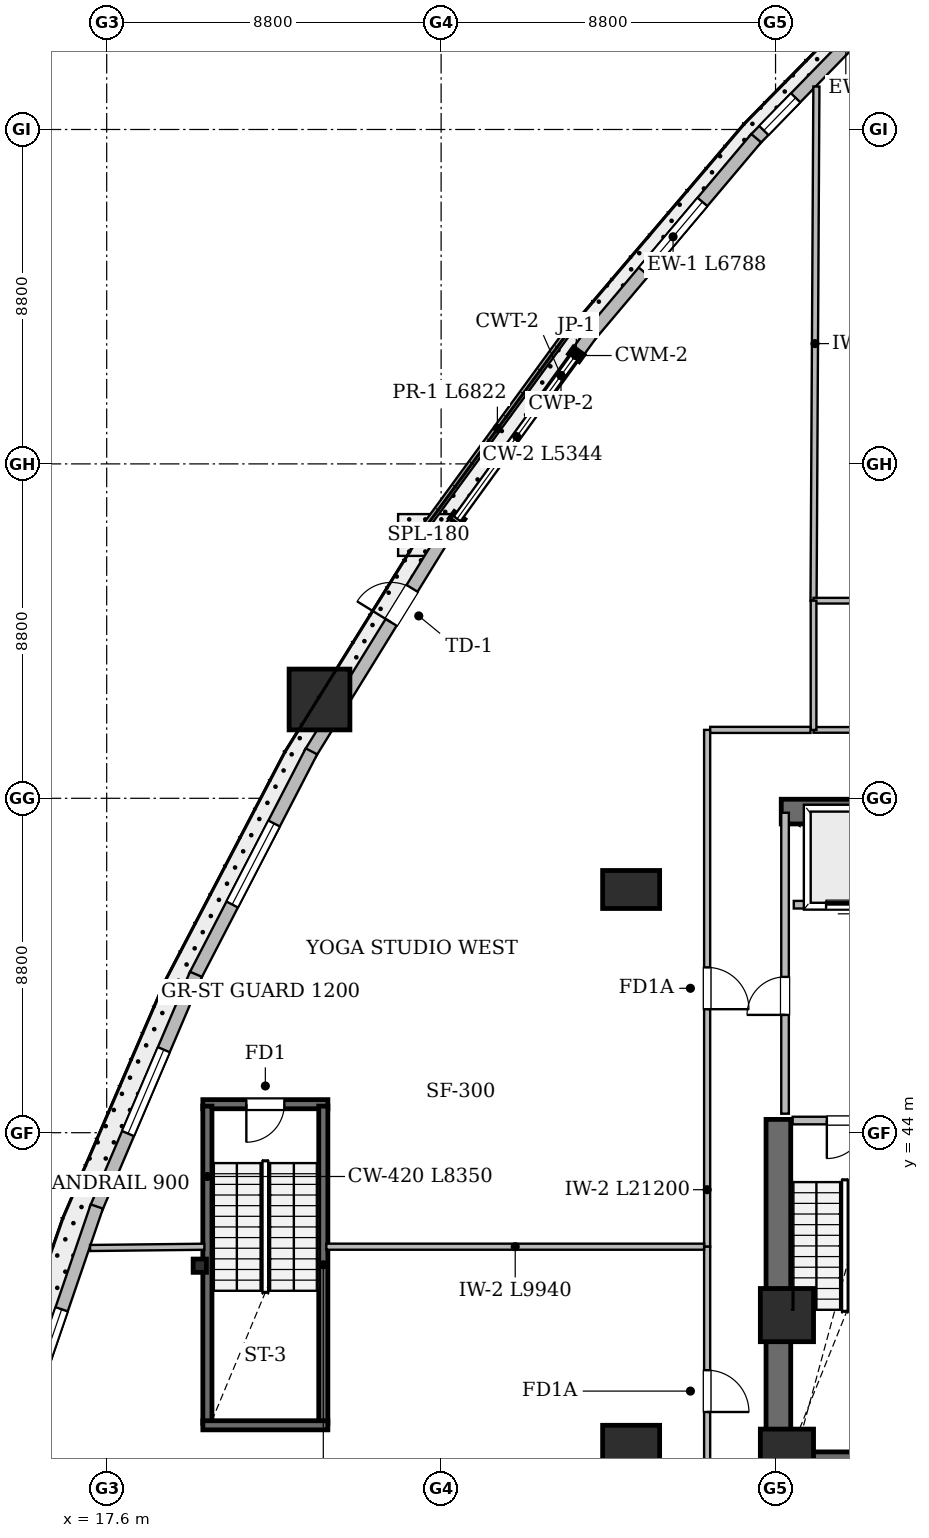
"""IFC4 building model, lengths in metres.
Left out: names, types, materials, properties, quantities, classifications, styles, units other than length and angle.
Written with IfcOpenShell. Run it as: python <this file> out.ifc"""

import sys

from ifc_helpers import new_model, si_unit, direction, frame, frame_2d, origin, origin_2d, place, context, subcontext, project, spatial, rectangle, i_section, extrude, element, fill, save


model = new_model("IFC4")
c1 = context("Model", 3, precision=1e-05, world=origin(), true_north=direction((0.0, 1.0)))
c2 = subcontext(c1, "Body", "Model", "MODEL_VIEW")
j1 = project(units=[si_unit("LENGTHUNIT", "METRE"), si_unit("PLANEANGLEUNIT", "RADIAN")], contexts=[c1])
p1 = place(None, origin())
s1 = spatial("IfcSite", under=j1, at=p1, CompositionType="ELEMENT")
p2 = place(p1, origin())
s2 = spatial("IfcBuilding", under=s1, at=p2, CompositionType="ELEMENT")
p3 = place(p2, frame((0.0, 0.0, 19.2)))
s3 = spatial("IfcBuildingStorey", under=s2, at=p3, CompositionType="ELEMENT", Elevation=19.2)
p4 = place(p3, frame((35.35, 52.45, 0.0), z_axis=(0.0, 0.0, 1.0), x_axis=(1.0, 0.0, 0.0)))
e1 = element("IfcWall", 1, at=p4, inside=s3, PredefinedType="SHEAR", context=c2, shape_type="SweptSolid", body=[
    extrude(rectangle(XDim=17.3, YDim=0.65, at=frame_2d((8.65, 0.0))), origin(), (0.0, 0.0, 1.0), 4.35),
])
p5 = place(p3, frame((34.95, 35.275, 0.0), z_axis=(0.0, 0.0, 1.0), x_axis=(1.0, 0.0, 0.0)))
e2 = element("IfcWall", 2, at=p5, inside=s3, PredefinedType="SHEAR", context=c2, shape_type="SweptSolid", body=[
    extrude(rectangle(XDim=4.15, YDim=0.65, at=frame_2d((2.075, 0.0))), origin(), (0.0, 0.0, 1.0), 4.35),
])
p6 = place(p3, frame((35.275, 34.95, 0.0), z_axis=(0.0, 0.0, 1.0), x_axis=(0.0, 1.0, 0.0)))
e3 = element("IfcWall", 3, at=p6, inside=s3, PredefinedType="SHEAR", context=c2, shape_type="SweptSolid", body=[
    extrude(rectangle(XDim=9.4, YDim=0.65, at=frame_2d((4.7, 0.0))), origin(), (0.0, 0.0, 1.0), 4.35),
])
for number, where, z_axis, x_axis in (
    (4, (35.5, 35.5, 0.0), (0.0, 0.0, 1.0), (1.0, 0.0, 0.0)),
    (5, (35.5, 39.2, 0.0), (0.0, 0.0, 1.0), (1.0, 0.0, 0.0)),
):
    element("IfcColumn", number, at=place(p3, frame(where, z_axis=z_axis, x_axis=x_axis)), inside=s3, PredefinedType="COLUMN", context=c2, shape_type="SweptSolid", body=[
        extrude(rectangle(XDim=1.4, YDim=1.4, at=origin_2d()), origin(), (0.0, 0.0, 1.0), 4.8),
    ])
for number, where, z_axis, x_axis in (
    (6, (31.4, 35.8, 0.0), (0.0, 0.0, 1.0), (1.0, 0.0, 0.0)),
    (7, (31.4, 50.4, 0.0), (0.0, 0.0, 1.0), (1.0, 0.0, 0.0)),
):
    element("IfcColumn", number, at=place(p3, frame(where, z_axis=z_axis, x_axis=x_axis)), inside=s3, PredefinedType="COLUMN", context=c2, shape_type="SweptSolid", body=[
        extrude(rectangle(XDim=1.5, YDim=1.0, at=origin_2d()), origin(), (0.0, 0.0, 1.0), 4.8),
    ])
p7 = place(p3, frame((23.2, 55.4, 0.0), z_axis=(0.0, 0.0, 1.0), x_axis=(1.0, 0.0, 0.0)))
e8 = element("IfcColumn", 8, at=p7, inside=s3, PredefinedType="COLUMN", context=c2, shape_type="SweptSolid", body=[
    extrude(rectangle(XDim=1.6, YDim=1.6, at=origin_2d()), origin(), (0.0, 0.0, 1.0), 4.8),
])
p8 = place(p3, frame((20.05, 40.5, 0.0), z_axis=(0.0, 0.0, 1.0), x_axis=(1.0, 0.0, 0.0)))
e9 = element("IfcColumn", 9, at=p8, inside=s3, PredefinedType="PILASTER", context=c2, shape_type="SweptSolid", body=[
    extrude(i_section(OverallWidth=0.35, OverallDepth=0.35, WebThickness=0.012, FlangeThickness=0.019, FilletRadius=0.02, at=origin_2d()), origin(), (0.0, 0.0, 1.0), 4.8),
])
p9 = place(p3, frame((39.454, 75.062, 0.0), z_axis=(0.0, 0.0, 1.0), x_axis=(-0.697411972143, -0.716670455029, 0.0)))
e10 = element("IfcWall", 10, at=p9, inside=s3, PredefinedType="SOLIDWALL", context=c2, shape_type="SweptSolid", body=[
    extrude(rectangle(XDim=6.896, YDim=0.34, at=frame_2d((3.448, 0.0))), origin(), (0.0, 0.0, 1.0), 4.35),
])
p10 = place(p9, frame((1.053, 0.0, 0.75)))
e11 = element("IfcOpeningElement", 11, at=p10, cuts=e10, PredefinedType="OPENING", context=c2, shape_type="SweptSolid", body=[
    extrude(rectangle(XDim=2.4, YDim=2.2, at=frame_2d((1.2, 1.1))), frame((0.0, 0.18, 0.0), z_axis=(0.0, -1.0, 0.0), x_axis=(1.0, 0.0, 0.0)), (0.0, 0.0, 1.0), 0.36),
])
p11 = place(p9, frame((5.341, 0.0, 0.78)))
e12 = element("IfcOpeningElement", 12, at=p11, cuts=e10, PredefinedType="OPENING", context=c2, shape_type="SweptSolid", body=[
    extrude(rectangle(XDim=1.2, YDim=1.55, at=frame_2d((0.6, 0.775))), frame((0.0, 0.18, 0.0), z_axis=(0.0, -1.0, 0.0), x_axis=(1.0, 0.0, 0.0)), (0.0, 0.0, 1.0), 0.36),
])
p12 = place(p3, frame((34.691, 70.171, 0.0), z_axis=(0.0, 0.0, 1.0), x_axis=(-0.64454325071, -0.764567850465, 0.0)))
e13 = element("IfcWall", 13, at=p12, inside=s3, PredefinedType="SOLIDWALL", context=c2, shape_type="SweptSolid", body=[
    extrude(rectangle(XDim=6.788, YDim=0.34, at=frame_2d((3.394, 0.0))), origin(), (0.0, 0.0, 1.0), 4.35),
])
p13 = place(p12, frame((2.194, 0.0, 0.75)))
e14 = element("IfcOpeningElement", 14, at=p13, cuts=e13, PredefinedType="OPENING", context=c2, shape_type="SweptSolid", body=[
    extrude(rectangle(XDim=2.4, YDim=2.2, at=frame_2d((1.2, 1.1))), frame((0.0, 0.18, 0.0), z_axis=(0.0, -1.0, 0.0), x_axis=(1.0, 0.0, 0.0)), (0.0, 0.0, 1.0), 0.36),
])
p14 = place(p3, frame((30.359, 65.037, 0.0), z_axis=(0.0, 0.0, 1.0), x_axis=(-0.586729168236, -0.809783232193, 0.0)))
e15 = element("IfcWall", 15, at=p14, inside=s3, PredefinedType="SOLIDWALL", context=c2, shape_type="SweptSolid", body=[
    extrude(rectangle(XDim=0.705, YDim=0.34, at=frame_2d((0.353, 0.0))), origin(), (0.0, 0.0, 1.0), 4.35),
])
p15 = place(p3, frame((26.833, 60.171, 0.0), z_axis=(0.0, 0.0, 1.0), x_axis=(-0.586956222387, -0.809618671352, 0.0)))
e16 = element("IfcWall", 16, at=p15, inside=s3, PredefinedType="SOLIDWALL", context=c2, shape_type="SweptSolid", body=[
    extrude(rectangle(XDim=0.705, YDim=0.34, at=frame_2d((0.353, 0.0))), origin(), (0.0, 0.0, 1.0), 4.35),
])
p16 = place(p3, frame((26.458, 59.658, 0.0), z_axis=(0.0, 0.0, 1.0), x_axis=(-0.524888702996, -0.851170869724, 0.0)))
e17 = element("IfcWall", 17, at=p16, inside=s3, PredefinedType="SOLIDWALL", context=c2, shape_type="SweptSolid", body=[
    extrude(rectangle(XDim=6.677, YDim=0.34, at=frame_2d((3.339, 0.0))), origin(), (0.0, 0.0, 1.0), 3.538),
])
p17 = place(p16, frame((1.567, 0.0, 0.0)))
e18 = element("IfcOpeningElement", 18, at=p17, cuts=e17, PredefinedType="OPENING", context=c2, shape_type="SweptSolid", body=[
    extrude(rectangle(XDim=1.05, YDim=2.15, at=frame_2d((0.525, 1.075))), frame((0.0, 0.18, 0.0), z_axis=(0.0, -1.0, 0.0), x_axis=(1.0, 0.0, 0.0)), (0.0, 0.0, 1.0), 0.36),
])
p18 = place(p3, frame((22.988, 54.035, 0.0), z_axis=(0.0, 0.0, 1.0), x_axis=(-0.459645718279, -0.88810236666, 0.0)))
e19 = element("IfcWall", 19, at=p18, inside=s3, PredefinedType="SOLIDWALL", context=c2, shape_type="SweptSolid", body=[
    extrude(rectangle(XDim=6.677, YDim=0.34, at=frame_2d((3.338, 0.0))), origin(), (0.0, 0.0, 1.0), 4.35),
])
p19 = place(p18, frame((2.138, 0.0, 0.75)))
e20 = element("IfcOpeningElement", 20, at=p19, cuts=e19, PredefinedType="OPENING", context=c2, shape_type="SweptSolid", body=[
    extrude(rectangle(XDim=2.4, YDim=2.2, at=frame_2d((1.2, 1.1))), frame((0.0, 0.18, 0.0), z_axis=(0.0, -1.0, 0.0), x_axis=(1.0, 0.0, 0.0)), (0.0, 0.0, 1.0), 0.36),
])
p20 = place(p3, frame((19.949, 48.169, 0.0), z_axis=(0.0, 0.0, 1.0), x_axis=(-0.392198319583, -0.919880686892, 0.0)))
e21 = element("IfcWall", 21, at=p20, inside=s3, PredefinedType="SOLIDWALL", context=c2, shape_type="SweptSolid", body=[
    extrude(rectangle(XDim=6.714, YDim=0.34, at=frame_2d((3.357, 0.0))), origin(), (0.0, 0.0, 1.0), 4.35),
])
p21 = place(p20, frame((2.157, 0.0, 0.75)))
e22 = element("IfcOpeningElement", 22, at=p21, cuts=e21, PredefinedType="OPENING", context=c2, shape_type="SweptSolid", body=[
    extrude(rectangle(XDim=2.4, YDim=2.2, at=frame_2d((1.2, 1.1))), frame((0.0, 0.18, 0.0), z_axis=(0.0, -1.0, 0.0), x_axis=(1.0, 0.0, 0.0)), (0.0, 0.0, 1.0), 0.36),
])
p22 = place(p3, frame((17.341, 42.058, 0.0), z_axis=(0.0, 0.0, 1.0), x_axis=(-0.323760553486, -0.946139051095, 0.0)))
e23 = element("IfcWall", 23, at=p22, inside=s3, PredefinedType="SOLIDWALL", context=c2, shape_type="SweptSolid", body=[
    extrude(rectangle(XDim=6.787, YDim=0.34, at=frame_2d((3.394, 0.0))), origin(), (0.0, 0.0, 1.0), 4.35),
])
p23 = place(p22, frame((2.859, 0.0, 0.75)))
e24 = element("IfcOpeningElement", 24, at=p23, cuts=e23, PredefinedType="OPENING", context=c2, shape_type="SweptSolid", body=[
    extrude(rectangle(XDim=2.4, YDim=2.2, at=frame_2d((1.2, 1.1))), frame((0.0, 0.18, 0.0), z_axis=(0.0, -1.0, 0.0), x_axis=(1.0, 0.0, 0.0)), (0.0, 0.0, 1.0), 0.36),
])
p24 = place(p3, frame((29.894, 65.291, 0.0), z_axis=(0.0, 0.0, 1.0), x_axis=(-0.590210373126, -0.807249475351, 0.0)))
e25 = element("IfcWall", 25, at=p24, inside=s3, PredefinedType="PARAPET", context=c2, shape_type="SweptSolid", body=[
    extrude(rectangle(XDim=6.822, YDim=0.18, at=frame_2d((3.411, 0.0))), origin(), (0.0, 0.0, 1.0), 0.45),
])
p25 = place(p3, frame((20.13, 44.75, 0.0), z_axis=(0.0, 0.0, 1.0), x_axis=(1.0, 0.0, 0.0)))
e26 = element("IfcWall", 26, at=p25, inside=s3, PredefinedType="SHEAR", context=c2, shape_type="SweptSolid", body=[
    extrude(rectangle(XDim=3.29, YDim=0.24, at=frame_2d((1.645, 0.0))), origin(), (0.0, 0.0, 1.0), 4.35),
])
p26 = place(p25, frame((1.145, 0.0, 0.0)))
e27 = element("IfcOpeningElement", 27, at=p26, cuts=e26, PredefinedType="OPENING", context=c2, shape_type="SweptSolid", body=[
    extrude(rectangle(XDim=1.0, YDim=2.15, at=frame_2d((0.5, 1.075))), frame((0.0, 0.13, 0.0), z_axis=(0.0, -1.0, 0.0), x_axis=(1.0, 0.0, 0.0)), (0.0, 0.0, 1.0), 0.26),
])
for number, where, z_axis, x_axis in (
    (28, (20.25, 36.35, 0.0), (0.0, 0.0, 1.0), (0.0, 1.0, 0.0)),
    (29, (23.3, 36.35, 0.0), (0.0, 0.0, 1.0), (0.0, 1.0, 0.0)),
):
    element("IfcWall", number, at=place(p3, frame(where, z_axis=z_axis, x_axis=x_axis)), inside=s3, PredefinedType="SHEAR", context=c2, shape_type="SweptSolid", body=[
        extrude(rectangle(XDim=8.35, YDim=0.24, at=frame_2d((4.175, 0.0))), origin(), (0.0, 0.0, 1.0), 4.35),
    ])
p27 = place(p3, frame((20.13, 36.3, 0.0), z_axis=(0.0, 0.0, 1.0), x_axis=(1.0, 0.0, 0.0)))
e30 = element("IfcWall", 30, at=p27, inside=s3, PredefinedType="SHEAR", context=c2, shape_type="SweptSolid", body=[
    extrude(rectangle(XDim=3.29, YDim=0.24, at=frame_2d((1.645, 0.0))), origin(), (0.0, 0.0, 1.0), 4.35),
])
p28 = place(p3, frame((33.4, 54.6, 0.0), z_axis=(0.0, 0.0, 1.0), x_axis=(0.0, -1.0, 0.0)))
e31 = element("IfcWall", 31, at=p28, inside=s3, PredefinedType="SOLIDWALL", context=c2, shape_type="SweptSolid", body=[
    extrude(rectangle(XDim=13.6, YDim=0.16, at=frame_2d((6.8, 0.0))), origin(), (0.0, 0.0, 1.0), 3.588),
])
p29 = place(p28, frame((6.25, 0.0, 0.0)))
e32 = element("IfcOpeningElement", 32, at=p29, cuts=e31, PredefinedType="OPENING", context=c2, shape_type="SweptSolid", body=[
    extrude(rectangle(XDim=1.1, YDim=2.15, at=frame_2d((0.55, 1.075))), frame((0.0, 0.09, 0.0), z_axis=(0.0, -1.0, 0.0), x_axis=(1.0, 0.0, 0.0)), (0.0, 0.0, 1.0), 0.18),
])
p30 = place(p3, frame((35.45, 44.5, 0.0), z_axis=(0.0, 0.0, 1.0), x_axis=(0.0, 1.0, 0.0)))
e33 = element("IfcWall", 33, at=p30, inside=s3, PredefinedType="SOLIDWALL", context=c2, shape_type="SweptSolid", body=[
    extrude(rectangle(XDim=7.92, YDim=0.2, at=frame_2d((3.96, 0.0))), origin(), (0.0, 0.0, 1.0), 4.35),
])
p31 = place(p30, frame((2.6, 0.0, 0.0)))
e34 = element("IfcOpeningElement", 34, at=p31, cuts=e33, PredefinedType="OPENING", context=c2, shape_type="SweptSolid", body=[
    extrude(rectangle(XDim=1.0, YDim=2.15, at=frame_2d((0.5, 1.075))), frame((0.0, 0.11, 0.0), z_axis=(0.0, -1.0, 0.0), x_axis=(1.0, 0.0, 0.0)), (0.0, 0.0, 1.0), 0.22),
])
p32 = place(p3, frame((33.4, 41.0, 0.0), z_axis=(0.0, 0.0, 1.0), x_axis=(0.0, -1.0, 0.0)))
e35 = element("IfcWall", 35, at=p32, inside=s3, PredefinedType="SOLIDWALL", context=c2, shape_type="SweptSolid", body=[
    extrude(rectangle(XDim=7.6, YDim=0.16, at=frame_2d((3.8, 0.0))), origin(), (0.0, 0.0, 1.0), 3.638),
])
p33 = place(p32, frame((3.25, 0.0, 0.0)))
e36 = element("IfcOpeningElement", 36, at=p33, cuts=e35, PredefinedType="OPENING", context=c2, shape_type="SweptSolid", body=[
    extrude(rectangle(XDim=1.1, YDim=2.15, at=frame_2d((0.55, 1.075))), frame((0.0, 0.09, 0.0), z_axis=(0.0, -1.0, 0.0), x_axis=(1.0, 0.0, 0.0)), (0.0, 0.0, 1.0), 0.18),
])
p34 = place(p3, frame((40.0, 54.6, 0.0), z_axis=(0.0, 0.0, 1.0), x_axis=(-1.0, 0.0, 0.0)))
e37 = element("IfcWall", 37, at=p34, inside=s3, PredefinedType="PLUMBINGWALL", context=c2, shape_type="SweptSolid", body=[
    extrude(rectangle(XDim=3.8, YDim=0.15, at=frame_2d((1.9, 0.0))), origin(), (0.0, 0.0, 1.0), 3.638),
])
p35 = place(p34, frame((1.45, 0.0, 0.0)))
e38 = element("IfcOpeningElement", 38, at=p35, cuts=e37, PredefinedType="OPENING", context=c2, shape_type="SweptSolid", body=[
    extrude(rectangle(XDim=0.9, YDim=2.1, at=frame_2d((0.45, 1.05))), frame((0.0, 0.085, 0.0), z_axis=(0.0, -1.0, 0.0), x_axis=(1.0, 0.0, 0.0)), (0.0, 0.0, 1.0), 0.17),
])
p36 = place(p3, frame((35.65, 44.32, 0.0), z_axis=(0.0, 0.0, 1.0), x_axis=(1.0, 0.0, 0.0)))
e39 = element("IfcWall", 39, at=p36, inside=s3, PredefinedType="SOLIDWALL", context=c2, shape_type="SweptSolid", body=[
    extrude(rectangle(XDim=2.8, YDim=0.2, at=frame_2d((1.4, 0.0))), origin(), (0.0, 0.0, 1.0), 4.35),
])
p37 = place(p36, frame((0.9, 0.0, 0.0)))
e40 = element("IfcOpeningElement", 40, at=p37, cuts=e39, PredefinedType="OPENING", context=c2, shape_type="SweptSolid", body=[
    extrude(rectangle(XDim=1.0, YDim=2.15, at=frame_2d((0.5, 1.075))), frame((0.0, 0.11, 0.0), z_axis=(0.0, -1.0, 0.0), x_axis=(1.0, 0.0, 0.0)), (0.0, 0.0, 1.0), 0.22),
])
p38 = place(p3, frame((35.68, 50.0, 0.0), z_axis=(0.0, 0.0, 1.0), x_axis=(1.0, 0.0, 0.0)))
e41 = element("IfcWall", 41, at=p38, inside=s3, PredefinedType="SOLIDWALL", context=c2, shape_type="SweptSolid", body=[
    extrude(rectangle(XDim=2.8, YDim=0.2, at=frame_2d((1.4, 0.0))), origin(), (0.0, 0.0, 1.0), 4.35),
])
p39 = place(p38, frame((0.85, 0.0, 0.0)))
e42 = element("IfcOpeningElement", 42, at=p39, cuts=e41, PredefinedType="OPENING", context=c2, shape_type="SweptSolid", body=[
    extrude(rectangle(XDim=1.1, YDim=2.15, at=frame_2d((0.55, 1.075))), frame((0.0, 0.11, 0.0), z_axis=(0.0, -1.0, 0.0), x_axis=(1.0, 0.0, 0.0)), (0.0, 0.0, 1.0), 0.22),
])
p40 = place(p3, frame((36.2, 58.0, 0.0), z_axis=(0.0, 0.0, 1.0), x_axis=(0.005539131593, 0.999984658893, 0.0)))
e43 = element("IfcWall", 43, at=p40, inside=s3, PredefinedType="SOLIDWALL", context=c2, shape_type="SweptSolid", body=[
    extrude(rectangle(XDim=13.531, YDim=0.16, at=frame_2d((6.766, 0.0))), origin(), (0.0, 0.0, 1.0), 3.638),
])
p41 = place(p3, frame((33.32, 41.0, 0.0), z_axis=(0.0, 0.0, 1.0), x_axis=(-1.0, 0.0, 0.0)))
e44 = element("IfcWall", 44, at=p41, inside=s3, PredefinedType="SOLIDWALL", context=c2, shape_type="SweptSolid", body=[
    extrude(rectangle(XDim=9.94, YDim=0.16, at=frame_2d((4.97, 0.0))), origin(), (0.0, 0.0, 1.0), 3.638),
])
p42 = place(p3, frame((40.0, 58.0, 0.0), z_axis=(0.0, 0.0, 1.0), x_axis=(-1.0, 0.0, 0.0)))
e45 = element("IfcWall", 45, at=p42, inside=s3, PredefinedType="PLUMBINGWALL", context=c2, shape_type="SweptSolid", body=[
    extrude(rectangle(XDim=3.8, YDim=0.15, at=frame_2d((1.9, 0.0))), origin(), (0.0, 0.0, 1.0), 4.35),
])
p43 = place(p3, frame((36.2, 58.0, 0.0), z_axis=(0.0, 0.0, 1.0), x_axis=(0.0, -1.0, 0.0)))
e46 = element("IfcWall", 46, at=p43, inside=s3, PredefinedType="PLUMBINGWALL", context=c2, shape_type="SweptSolid", body=[
    extrude(rectangle(XDim=3.4, YDim=0.15, at=frame_2d((1.7, 0.0))), origin(), (0.0, 0.0, 1.0), 4.35),
])
p44 = place(p3, frame((20.17, 40.999, 0.0), z_axis=(0.0, 0.0, 1.0), x_axis=(-0.999939929804, -0.010960692638, 0.0)))
e47 = element("IfcWall", 47, at=p44, inside=s3, PredefinedType="SOLIDWALL", context=c2, shape_type="SweptSolid", body=[
    extrude(rectangle(XDim=3.007, YDim=0.16, at=frame_2d((1.503, 0.0))), origin(), (0.0, 0.0, 1.0), 4.35),
])
p45 = place(p3, frame((36.12, 54.6, 0.0), z_axis=(0.0, 0.0, 1.0), x_axis=(-1.0, 0.0, 0.0)))
e48 = element("IfcWall", 48, at=p45, inside=s3, PredefinedType="SOLIDWALL", context=c2, shape_type="SweptSolid", body=[
    extrude(rectangle(XDim=2.64, YDim=0.16, at=frame_2d((1.32, 0.0))), origin(), (0.0, 0.0, 1.0), 4.35),
])
p46 = place(p11, origin())
e49 = element("IfcWindow", 49, at=p46, inside=s3, PartitioningType="SINGLE_PANEL", PredefinedType="WINDOW", context=c2, shape_type="SweptSolid", body=[
    extrude(rectangle(XDim=1.2, YDim=1.55, at=frame_2d((0.6, 0.775))), frame((0.0, 0.03, 0.0), z_axis=(0.0, -1.0, 0.0), x_axis=(1.0, 0.0, 0.0)), (0.0, 0.0, 1.0), 0.06),
])
fill(e12, e49)
p47 = place(p13, origin())
e50 = element("IfcWindow", 50, at=p47, inside=s3, PartitioningType="SINGLE_PANEL", PredefinedType="WINDOW", context=c2, shape_type="SweptSolid", body=[
    extrude(rectangle(XDim=2.4, YDim=2.2, at=frame_2d((1.2, 1.1))), frame((0.0, 0.03, 0.0), z_axis=(0.0, -1.0, 0.0), x_axis=(1.0, 0.0, 0.0)), (0.0, 0.0, 1.0), 0.06),
])
fill(e14, e50)
p48 = place(p17, frame((1.05, 0.0, 0.0), z_axis=(0.0, 0.0, 1.0), x_axis=(-1.0, 0.0, 0.0)))
e51 = element("IfcDoor", 51, at=p48, inside=s3, OperationType="SINGLE_SWING_RIGHT", PredefinedType="DOOR", context=c2, shape_type="SweptSolid", body=[
    extrude(rectangle(XDim=1.05, YDim=2.15, at=frame_2d((0.525, 1.075))), frame((0.0, 0.025, 0.0), z_axis=(0.0, -1.0, 0.0), x_axis=(1.0, 0.0, 0.0)), (0.0, 0.0, 1.0), 0.05),
])
fill(e18, e51)
p49 = place(p19, origin())
e52 = element("IfcWindow", 52, at=p49, inside=s3, PartitioningType="SINGLE_PANEL", PredefinedType="WINDOW", context=c2, shape_type="SweptSolid", body=[
    extrude(rectangle(XDim=2.4, YDim=2.2, at=frame_2d((1.2, 1.1))), frame((0.0, 0.03, 0.0), z_axis=(0.0, -1.0, 0.0), x_axis=(1.0, 0.0, 0.0)), (0.0, 0.0, 1.0), 0.06),
])
fill(e20, e52)
p50 = place(p21, origin())
e53 = element("IfcWindow", 53, at=p50, inside=s3, PartitioningType="SINGLE_PANEL", PredefinedType="WINDOW", context=c2, shape_type="SweptSolid", body=[
    extrude(rectangle(XDim=2.4, YDim=2.2, at=frame_2d((1.2, 1.1))), frame((0.0, 0.03, 0.0), z_axis=(0.0, -1.0, 0.0), x_axis=(1.0, 0.0, 0.0)), (0.0, 0.0, 1.0), 0.06),
])
fill(e22, e53)
p51 = place(p23, origin())
e54 = element("IfcWindow", 54, at=p51, inside=s3, PartitioningType="SINGLE_PANEL", PredefinedType="WINDOW", context=c2, shape_type="SweptSolid", body=[
    extrude(rectangle(XDim=2.4, YDim=2.2, at=frame_2d((1.2, 1.1))), frame((0.0, 0.03, 0.0), z_axis=(0.0, -1.0, 0.0), x_axis=(1.0, 0.0, 0.0)), (0.0, 0.0, 1.0), 0.06),
])
fill(e24, e54)
p52 = place(p26, frame((1.0, 0.0, 0.0), z_axis=(0.0, 0.0, 1.0), x_axis=(-1.0, 0.0, 0.0)))
e55 = element("IfcDoor", 55, at=p52, inside=s3, OperationType="SINGLE_SWING_LEFT", PredefinedType="DOOR", context=c2, shape_type="SweptSolid", body=[
    extrude(rectangle(XDim=1.0, YDim=2.15, at=frame_2d((0.5, 1.075))), frame((0.0, 0.025, 0.0), z_axis=(0.0, -1.0, 0.0), x_axis=(1.0, 0.0, 0.0)), (0.0, 0.0, 1.0), 0.05),
])
fill(e27, e55)
p53 = place(p37, frame((1.0, 0.0, 0.0), z_axis=(0.0, 0.0, 1.0), x_axis=(-1.0, 0.0, 0.0)))
e56 = element("IfcDoor", 56, at=p53, inside=s3, OperationType="SINGLE_SWING_LEFT", PredefinedType="DOOR", context=c2, shape_type="SweptSolid", body=[
    extrude(rectangle(XDim=1.0, YDim=2.15, at=frame_2d((0.5, 1.075))), frame((0.0, 0.025, 0.0), z_axis=(0.0, -1.0, 0.0), x_axis=(1.0, 0.0, 0.0)), (0.0, 0.0, 1.0), 0.05),
])
fill(e40, e56)
p54 = place(p31, origin())
e57 = element("IfcDoor", 57, at=p54, inside=s3, OperationType="SINGLE_SWING_LEFT", PredefinedType="DOOR", context=c2, shape_type="SweptSolid", body=[
    extrude(rectangle(XDim=1.0, YDim=2.15, at=frame_2d((0.5, 1.075))), frame((0.0, 0.025, 0.0), z_axis=(0.0, -1.0, 0.0), x_axis=(1.0, 0.0, 0.0)), (0.0, 0.0, 1.0), 0.05),
])
fill(e34, e57)
p55 = place(p39, origin())
e58 = element("IfcDoor", 58, at=p55, inside=s3, OperationType="SLIDING_TO_LEFT", PredefinedType="DOOR", context=c2, shape_type="SweptSolid", body=[
    extrude(rectangle(XDim=1.1, YDim=2.15, at=frame_2d((0.55, 1.075))), frame((0.0, 0.025, 0.0), z_axis=(0.0, -1.0, 0.0), x_axis=(1.0, 0.0, 0.0)), (0.0, 0.0, 1.0), 0.05),
])
fill(e42, e58)
p56 = place(p33, origin())
e59 = element("IfcDoor", 59, at=p56, inside=s3, OperationType="SINGLE_SWING_RIGHT", PredefinedType="DOOR", context=c2, shape_type="SweptSolid", body=[
    extrude(rectangle(XDim=1.1, YDim=2.15, at=frame_2d((0.55, 1.075))), frame((0.0, 0.025, 0.0), z_axis=(0.0, -1.0, 0.0), x_axis=(1.0, 0.0, 0.0)), (0.0, 0.0, 1.0), 0.05),
])
fill(e36, e59)
p57 = place(p29, origin())
e60 = element("IfcDoor", 60, at=p57, inside=s3, OperationType="SINGLE_SWING_RIGHT", PredefinedType="DOOR", context=c2, shape_type="SweptSolid", body=[
    extrude(rectangle(XDim=1.1, YDim=2.15, at=frame_2d((0.55, 1.075))), frame((0.0, 0.025, 0.0), z_axis=(0.0, -1.0, 0.0), x_axis=(1.0, 0.0, 0.0)), (0.0, 0.0, 1.0), 0.05),
])
fill(e32, e60)
save(model, sys.argv[1])
